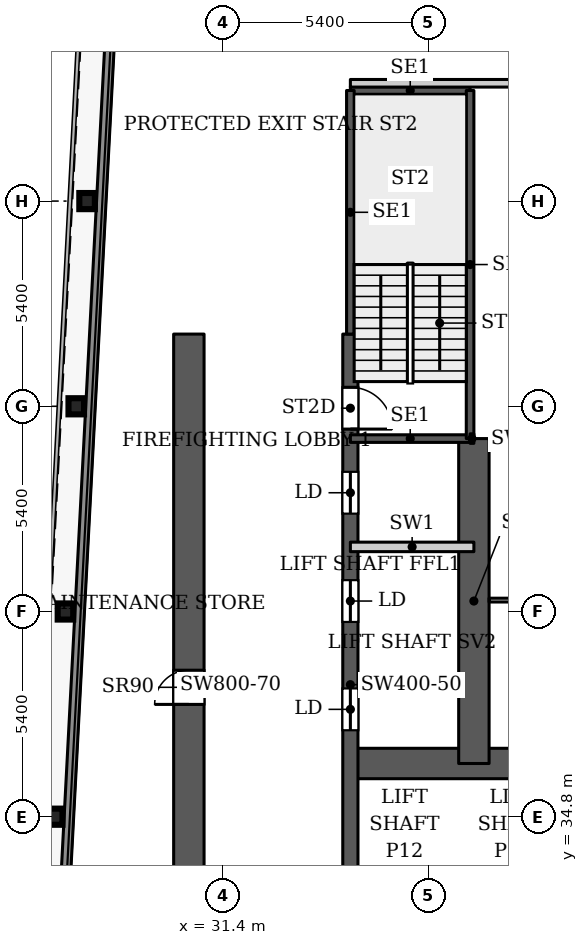
"""IFC4 building model, lengths in metres.
Left out: names, types, materials, properties, quantities, classifications, styles, units other than length and angle.
Written with IfcOpenShell. Run it as: python <this file> out.ifc"""

import sys

from ifc_helpers import new_model, si_unit, direction, frame, frame_2d, origin, origin_2d, place, context, subcontext, project, spatial, rectangle, i_section, extrude, source, transform, mapped, element, fill, save


model = new_model("IFC4")
c1 = context("Model", 3, precision=1e-05, world=origin(), true_north=direction((0.0, 1.0)))
c2 = subcontext(c1, "Body", "Model", "MODEL_VIEW")
j1 = project(units=[si_unit("LENGTHUNIT", "METRE"), si_unit("PLANEANGLEUNIT", "RADIAN")], contexts=[c1])
p1 = place(None, origin())
s1 = spatial("IfcSite", under=j1, at=p1, CompositionType="ELEMENT")
p2 = place(p1, origin())
s2 = spatial("IfcBuilding", under=s1, at=p2, CompositionType="ELEMENT")
p3 = place(p2, frame((0.0, 0.0, 195.5)))
s3 = spatial("IfcBuildingStorey", under=s2, at=p3, CompositionType="ELEMENT", Elevation=195.5)
for number, where, z_axis, x_axis in (
    (1, (26.969, 34.8, 0.0), (0.0, 0.0, 1.0), (1.0, 0.0, 0.0)),
    (2, (27.253, 40.2, 0.0), (0.0, 0.0, 1.0), (1.0, 0.0, 0.0)),
    (3, (27.537, 45.6, 0.0), (0.0, 0.0, 1.0), (1.0, 0.0, 0.0)),
    (4, (27.822, 51.0, 0.0), (0.0, 0.0, 1.0), (1.0, 0.0, 0.0)),
):
    element("IfcColumn", number, at=place(p3, frame(where, z_axis=z_axis, x_axis=x_axis)), inside=s3, PredefinedType="COLUMN", context=c2, shape_type="SweptSolid", body=[
        extrude(i_section(OverallWidth=0.409, OverallDepth=0.425, WebThickness=0.033, FlangeThickness=0.052, FilletRadius=0.013, at=origin_2d()), origin(), (0.0, 0.0, 1.0), 3.9),
    ])
p4 = place(p3, frame((34.75, 36.2, 0.0), z_axis=(0.0, 0.0, 1.0), x_axis=(1.0, 0.0, 0.0)))
e5 = element("IfcWall", 5, at=p4, inside=s3, PredefinedType="SHEAR", context=c2, shape_type="SweptSolid", body=[
    extrude(rectangle(XDim=18.4, YDim=0.8, at=frame_2d((9.2, 0.0))), origin(), (0.0, 0.0, 1.0), 3.9),
])
p5 = place(p4, frame((16.9, 0.0, 0.0)))
e6 = element("IfcOpeningElement", 6, at=p5, cuts=e5, PredefinedType="OPENING", context=c2, shape_type="SweptSolid", body=[
    extrude(rectangle(XDim=1.0, YDim=2.2, at=frame_2d((0.5, 1.1))), frame((0.0, 0.41, 0.0), z_axis=(0.0, -1.0, 0.0), x_axis=(1.0, 0.0, 0.0)), (0.0, 0.0, 1.0), 0.82),
])
p6 = place(p3, frame((34.75, 29.05, 0.0), z_axis=(0.0, 0.0, 1.0), x_axis=(0.0, 1.0, 0.0)))
e7 = element("IfcWall", 7, at=p6, inside=s3, PredefinedType="SHEAR", context=c2, shape_type="SweptSolid", body=[
    extrude(rectangle(XDim=18.45, YDim=0.4, at=frame_2d((9.225, 0.0))), origin(), (0.0, 0.0, 1.0), 3.9),
])
p7 = place(p6, frame((8.025, 0.0, 0.0)))
e8 = element("IfcOpeningElement", 8, at=p7, cuts=e7, PredefinedType="OPENING", context=c2, shape_type="SweptSolid", body=[
    extrude(rectangle(XDim=1.1, YDim=2.2, at=frame_2d((0.55, 1.1))), frame((0.0, 0.21, 0.0), z_axis=(0.0, -1.0, 0.0), x_axis=(1.0, 0.0, 0.0)), (0.0, 0.0, 1.0), 0.42),
])
p8 = place(p6, frame((10.875, 0.0, 0.0)))
e9 = element("IfcOpeningElement", 9, at=p8, cuts=e7, PredefinedType="OPENING", context=c2, shape_type="SweptSolid", body=[
    extrude(rectangle(XDim=1.1, YDim=2.2, at=frame_2d((0.55, 1.1))), frame((0.0, 0.21, 0.0), z_axis=(0.0, -1.0, 0.0), x_axis=(1.0, 0.0, 0.0)), (0.0, 0.0, 1.0), 0.42),
])
p9 = place(p6, frame((13.725, 0.0, 0.0)))
e10 = element("IfcOpeningElement", 10, at=p9, cuts=e7, PredefinedType="OPENING", context=c2, shape_type="SweptSolid", body=[
    extrude(rectangle(XDim=1.1, YDim=2.2, at=frame_2d((0.55, 1.1))), frame((0.0, 0.21, 0.0), z_axis=(0.0, -1.0, 0.0), x_axis=(1.0, 0.0, 0.0)), (0.0, 0.0, 1.0), 0.42),
])
p10 = place(p6, frame((15.95, 0.0, 0.0)))
e11 = element("IfcOpeningElement", 11, at=p10, cuts=e7, PredefinedType="OPENING", context=c2, shape_type="SweptSolid", body=[
    extrude(rectangle(XDim=1.1, YDim=2.2, at=frame_2d((0.55, 1.1))), frame((0.0, 0.21, 0.0), z_axis=(0.0, -1.0, 0.0), x_axis=(1.0, 0.0, 0.0)), (0.0, 0.0, 1.0), 0.42),
])
p11 = place(p3, frame((38.0, 36.2, 0.0), z_axis=(0.0, 0.0, 1.0), x_axis=(0.0, 1.0, 0.0)))
e12 = element("IfcWall", 12, at=p11, inside=s3, PredefinedType="SHEAR", context=c2, shape_type="SweptSolid", body=[
    extrude(rectangle(XDim=8.55, YDim=0.8, at=frame_2d((4.275, 0.0))), origin(), (0.0, 0.0, 1.0), 3.9),
])
p12 = place(p3, frame((30.5, 29.05, 0.0), z_axis=(0.0, 0.0, 1.0), x_axis=(0.0, 1.0, 0.0)))
e13 = element("IfcWall", 13, at=p12, inside=s3, PredefinedType="SHEAR", context=c2, shape_type="SweptSolid", body=[
    extrude(rectangle(XDim=18.45, YDim=0.8, at=frame_2d((9.225, 0.0))), origin(), (0.0, 0.0, 1.0), 3.9),
])
p13 = place(p12, frame((1.5, 0.0, 0.0)))
e14 = element("IfcOpeningElement", 14, at=p13, cuts=e13, PredefinedType="OPENING", context=c2, shape_type="SweptSolid", body=[
    extrude(rectangle(XDim=0.9, YDim=2.2, at=frame_2d((0.45, 1.1))), frame((0.0, 0.41, 0.0), z_axis=(0.0, -1.0, 0.0), x_axis=(1.0, 0.0, 0.0)), (0.0, 0.0, 1.0), 0.82),
])
p14 = place(p12, frame((8.705, 0.0, 0.0)))
e15 = element("IfcOpeningElement", 15, at=p14, cuts=e13, PredefinedType="OPENING", context=c2, shape_type="SweptSolid", body=[
    extrude(rectangle(XDim=0.9, YDim=2.2, at=frame_2d((0.45, 1.1))), frame((0.0, 0.41, 0.0), z_axis=(0.0, -1.0, 0.0), x_axis=(1.0, 0.0, 0.0)), (0.0, 0.0, 1.0), 0.82),
])
p15 = place(p3, frame((27.195, 31.969, 0.0), z_axis=(0.0, 0.0, 1.0), x_axis=(0.052554995867, 0.998618031286, 0.0)))
e16 = element("IfcWall", 16, at=p15, inside=s3, PredefinedType="SOLIDWALL", context=c2, shape_type="SweptSolid", body=[
    extrude(rectangle(XDim=66.787, YDim=0.25, at=frame_2d((33.394, 0.0))), origin(), (0.0, 0.0, 1.0), 3.75),
])
for number, where, z_axis, x_axis in (
    (17, (34.75, 44.75, 0.0), (0.0, 0.0, 1.0), (1.0, 0.0, 0.0)),
    (18, (34.75, 53.91, 0.0), (0.0, 0.0, 1.0), (1.0, 0.0, 0.0)),
):
    element("IfcWall", number, at=place(p3, frame(where, z_axis=z_axis, x_axis=x_axis)), inside=s3, PredefinedType="SHEAR", context=c2, shape_type="SweptSolid", body=[
        extrude(rectangle(XDim=3.15, YDim=0.2, at=frame_2d((1.575, 0.0))), origin(), (0.0, 0.0, 1.0), 3.9),
    ])
p16 = place(p3, frame((34.75, 47.5, 0.0), z_axis=(0.0, 0.0, 1.0), x_axis=(0.0, 1.0, 0.0)))
e19 = element("IfcWall", 19, at=p16, inside=s3, PredefinedType="SHEAR", context=c2, shape_type="SweptSolid", body=[
    extrude(rectangle(XDim=6.41, YDim=0.2, at=frame_2d((3.205, 0.0))), origin(), (0.0, 0.0, 1.0), 3.9),
])
p17 = place(p3, frame((37.9, 44.75, 0.0), z_axis=(0.0, 0.0, 1.0), x_axis=(0.0, 1.0, 0.0)))
e20 = element("IfcWall", 20, at=p17, inside=s3, PredefinedType="SHEAR", context=c2, shape_type="SweptSolid", body=[
    extrude(rectangle(XDim=9.16, YDim=0.2, at=frame_2d((4.58, 0.0))), origin(), (0.0, 0.0, 1.0), 3.9),
])
p18 = place(p3, frame((34.75, 41.9, 0.0), z_axis=(0.0, 0.0, 1.0), x_axis=(1.0, 0.0, 0.0)))
e21 = element("IfcWall", 21, at=p18, inside=s3, PredefinedType="PARTITIONING", context=c2, shape_type="SweptSolid", body=[
    extrude(rectangle(XDim=3.25, YDim=0.25, at=frame_2d((1.625, 0.0))), origin(), (0.0, 0.0, 1.0), 3.9),
])
p19 = place(p3, frame((37.9, 44.75, 0.0), z_axis=(0.0, 0.0, 1.0), x_axis=(1.0, 0.0, 0.0)))
e22 = element("IfcWall", 22, at=p19, inside=s3, PredefinedType="PARTITIONING", context=c2, shape_type="SweptSolid", body=[
    extrude(rectangle(XDim=0.1, YDim=0.25, at=frame_2d((0.05, 0.0))), origin(), (0.0, 0.0, 1.0), 3.9),
])
p20 = place(p3, frame((34.75, 54.1, 0.0), z_axis=(0.0, 0.0, 1.0), x_axis=(1.0, 0.0, 0.0)))
e23 = element("IfcWall", 23, at=p20, inside=s3, PredefinedType="PARTITIONING", context=c2, shape_type="SweptSolid", body=[
    extrude(rectangle(XDim=11.15, YDim=0.2, at=frame_2d((5.575, 0.0))), origin(), (0.0, 0.0, 1.0), 3.6),
])
p21 = place(p20, frame((5.075, 0.0, 0.0)))
e24 = element("IfcOpeningElement", 24, at=p21, cuts=e23, PredefinedType="OPENING", context=c2, shape_type="SweptSolid", body=[
    extrude(rectangle(XDim=1.0, YDim=2.1, at=frame_2d((0.5, 1.05))), frame((0.0, 0.11, 0.0), z_axis=(0.0, -1.0, 0.0), x_axis=(1.0, 0.0, 0.0)), (0.0, 0.0, 1.0), 0.22),
])
p22 = place(p3, frame((38.399, 40.5, 0.0), z_axis=(0.0, 0.0, 1.0), x_axis=(1.0, 0.0, 0.0)))
e25 = element("IfcWall", 25, at=p22, inside=s3, PredefinedType="PARTITIONING", context=c2, shape_type="SweptSolid", body=[
    extrude(rectangle(XDim=14.901, YDim=0.1, at=frame_2d((7.451, 0.0))), origin(), (0.0, 0.0, 1.0), 3.6),
])
p23 = place(p22, frame((6.801, 0.0, 0.0)))
e26 = element("IfcOpeningElement", 26, at=p23, cuts=e25, PredefinedType="OPENING", context=c2, shape_type="SweptSolid", body=[
    extrude(rectangle(XDim=1.0, YDim=2.1, at=frame_2d((0.5, 1.05))), frame((0.0, 0.06, 0.0), z_axis=(0.0, -1.0, 0.0), x_axis=(1.0, 0.0, 0.0)), (0.0, 0.0, 1.0), 0.12),
])
m1 = source(origin(), c2, "Body", "SweptSolid", [
    extrude(rectangle(XDim=1.1, YDim=2.2, at=frame_2d((0.55, 1.1))), frame((0.0, 0.025, 0.0), z_axis=(0.0, -1.0, 0.0), x_axis=(1.0, 0.0, 0.0)), (0.0, 0.0, 1.0), 0.05),
])
p24 = place(p7, origin())
e27 = element("IfcDoor", 27, at=p24, inside=s3, OperationType="SLIDING_TO_LEFT", PredefinedType="DOOR", context=c2, shape_type="MappedRepresentation", body=[
    mapped(m1, transform((0.0, 0.0, 0.0), x_axis=(1.0, 0.0, 0.0), y_axis=(0.0, 1.0, 0.0), z_axis=(0.0, 0.0, 1.0), scale=1.0)),
])
fill(e8, e27)
p25 = place(p8, origin())
e28 = element("IfcDoor", 28, at=p25, inside=s3, OperationType="SLIDING_TO_LEFT", PredefinedType="DOOR", context=c2, shape_type="MappedRepresentation", body=[
    mapped(m1, transform((0.0, 0.0, 0.0), x_axis=(1.0, 0.0, 0.0), y_axis=(0.0, 1.0, 0.0), z_axis=(0.0, 0.0, 1.0), scale=1.0)),
])
fill(e9, e28)
p26 = place(p9, origin())
e29 = element("IfcDoor", 29, at=p26, inside=s3, OperationType="SLIDING_TO_LEFT", PredefinedType="DOOR", context=c2, shape_type="MappedRepresentation", body=[
    mapped(m1, transform((0.0, 0.0, 0.0), x_axis=(1.0, 0.0, 0.0), y_axis=(0.0, 1.0, 0.0), z_axis=(0.0, 0.0, 1.0), scale=1.0)),
])
fill(e10, e29)
m2 = source(origin(), c2, "Body", "SweptSolid", [
    extrude(rectangle(XDim=0.9, YDim=2.2, at=frame_2d((0.45, 1.1))), frame((0.0, 0.025, 0.0), z_axis=(0.0, -1.0, 0.0), x_axis=(1.0, 0.0, 0.0)), (0.0, 0.0, 1.0), 0.05),
])
p27 = place(p14, origin())
e30 = element("IfcDoor", 30, at=p27, inside=s3, OperationType="SINGLE_SWING_LEFT", PredefinedType="DOOR", context=c2, shape_type="MappedRepresentation", body=[
    mapped(m2, transform((0.0, 0.0, 0.0), x_axis=(1.0, 0.0, 0.0), y_axis=(0.0, 1.0, 0.0), z_axis=(0.0, 0.0, 1.0), scale=1.0)),
])
fill(e15, e30)
m3 = source(origin(), c2, "Body", "SweptSolid", [
    extrude(rectangle(XDim=1.1, YDim=2.2, at=frame_2d((0.55, 1.1))), frame((0.0, 0.025, 0.0), z_axis=(0.0, -1.0, 0.0), x_axis=(1.0, 0.0, 0.0)), (0.0, 0.0, 1.0), 0.05),
])
p28 = place(p10, origin())
e31 = element("IfcDoor", 31, at=p28, inside=s3, OperationType="SINGLE_SWING_RIGHT", PredefinedType="DOOR", context=c2, shape_type="MappedRepresentation", body=[
    mapped(m3, transform((0.0, 0.0, 0.0), x_axis=(1.0, 0.0, 0.0), y_axis=(0.0, 1.0, 0.0), z_axis=(0.0, 0.0, 1.0), scale=1.0)),
])
fill(e11, e31)
save(model, sys.argv[1])
